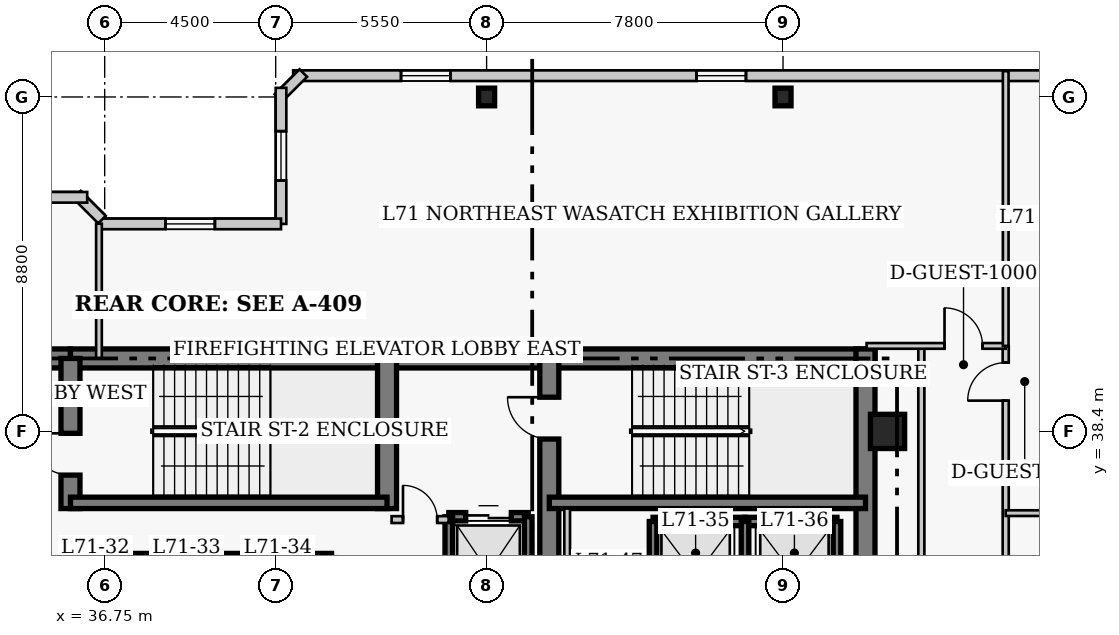
"""IFC4 building model, lengths in metres.
Left out: names, types, materials, properties, quantities, classifications, styles, units other than length and angle.
Written with IfcOpenShell. Run it as: python <this file> out.ifc"""

import sys

from ifc_helpers import new_model, si_unit, direction, frame, frame_2d, origin, origin_2d, place, context, subcontext, project, spatial, rectangle, i_section, extrude, element, fill, save


model = new_model("IFC4")
c1 = context("Model", 3, precision=1e-05, world=origin(), true_north=direction((0.0, 1.0)))
c2 = subcontext(c1, "Body", "Model", "MODEL_VIEW")
j1 = project(units=[si_unit("LENGTHUNIT", "METRE"), si_unit("PLANEANGLEUNIT", "RADIAN")], contexts=[c1])
p1 = place(None, origin())
s1 = spatial("IfcSite", under=j1, at=p1, CompositionType="ELEMENT")
p2 = place(p1, origin())
s2 = spatial("IfcBuilding", under=s1, at=p2, CompositionType="ELEMENT")
p3 = place(p2, frame((0.0, 0.0, 285.4)))
s3 = spatial("IfcBuildingStorey", under=s2, at=p3, CompositionType="ELEMENT", Elevation=285.4)
p4 = place(p3, frame((21.65, 40.32, 0.0), z_axis=(0.0, 0.0, 1.0), x_axis=(1.0, 0.0, 0.0)))
e1 = element("IfcWall", 1, at=p4, inside=s3, PredefinedType="SHEAR", context=c2, shape_type="SweptSolid", body=[
    extrude(rectangle(XDim=14.2, YDim=0.5, at=frame_2d((7.1, 0.0))), origin(), (0.0, 0.0, 1.0), 4.0),
])
p5 = place(p3, frame((35.85, 40.32, 0.0), z_axis=(0.0, 0.0, 1.0), x_axis=(1.0, 0.0, 0.0)))
e2 = element("IfcWall", 2, at=p5, inside=s3, PredefinedType="SHEAR", context=c2, shape_type="SweptSolid", body=[
    extrude(rectangle(XDim=12.6, YDim=0.5, at=frame_2d((6.3, 0.0))), origin(), (0.0, 0.0, 1.0), 4.0),
])
p6 = place(p3, frame((48.45, 40.32, 0.0), z_axis=(0.0, 0.0, 1.0), x_axis=(1.0, 0.0, 0.0)))
e3 = element("IfcWall", 3, at=p6, inside=s3, PredefinedType="SHEAR", context=c2, shape_type="SweptSolid", body=[
    extrude(rectangle(XDim=8.57, YDim=0.5, at=frame_2d((4.285, 0.0))), origin(), (0.0, 0.0, 1.0), 4.0),
])
p7 = place(p3, frame((56.77, 27.05, 0.0), z_axis=(0.0, 0.0, 1.0), x_axis=(0.0, 1.0, 0.0)))
e4 = element("IfcWall", 4, at=p7, inside=s3, PredefinedType="SHEAR", context=c2, shape_type="SweptSolid", body=[
    extrude(rectangle(XDim=13.52, YDim=0.5, at=frame_2d((6.76, 0.0))), origin(), (0.0, 0.0, 1.0), 4.0),
])
p8 = place(p3, frame((35.85, 36.37, 0.0), z_axis=(0.0, 0.0, 1.0), x_axis=(0.0, 1.0, 0.0)))
e5 = element("IfcWall", 5, at=p8, inside=s3, PredefinedType="SHEAR", context=c2, shape_type="SweptSolid", body=[
    extrude(rectangle(XDim=3.95, YDim=0.5, at=frame_2d((1.975, 0.0))), origin(), (0.0, 0.0, 1.0), 4.0),
])
p9 = place(p8, frame((0.88, 0.0, 0.0)))
e6 = element("IfcOpeningElement", 6, at=p9, cuts=e5, PredefinedType="OPENING", context=c2, shape_type="SweptSolid", body=[
    extrude(rectangle(XDim=1.1, YDim=2.15, at=frame_2d((0.55, 1.075))), frame((0.0, 0.26, 0.0), z_axis=(0.0, -1.0, 0.0), x_axis=(1.0, 0.0, 0.0)), (0.0, 0.0, 1.0), 0.52),
])
p10 = place(p3, frame((44.18, 36.37, 0.0), z_axis=(0.0, 0.0, 1.0), x_axis=(0.0, 1.0, 0.0)))
e7 = element("IfcWall", 7, at=p10, inside=s3, PredefinedType="SHEAR", context=c2, shape_type="SweptSolid", body=[
    extrude(rectangle(XDim=3.95, YDim=0.5, at=frame_2d((1.975, 0.0))), origin(), (0.0, 0.0, 1.0), 4.0),
])
p11 = place(p3, frame((48.45, 32.5, 0.0), z_axis=(0.0, 0.0, 1.0), x_axis=(0.0, 1.0, 0.0)))
e8 = element("IfcWall", 8, at=p11, inside=s3, PredefinedType="SHEAR", context=c2, shape_type="SweptSolid", body=[
    extrude(rectangle(XDim=7.82, YDim=0.5, at=frame_2d((3.91, 0.0))), origin(), (0.0, 0.0, 1.0), 4.0),
])
p12 = place(p11, frame((5.7, 0.0, 0.0)))
e9 = element("IfcOpeningElement", 9, at=p12, cuts=e8, PredefinedType="OPENING", context=c2, shape_type="SweptSolid", body=[
    extrude(rectangle(XDim=1.1, YDim=2.15, at=frame_2d((0.55, 1.075))), frame((0.0, 0.26, 0.0), z_axis=(0.0, -1.0, 0.0), x_axis=(1.0, 0.0, 0.0)), (0.0, 0.0, 1.0), 0.52),
])
p13 = place(p3, frame((35.85, 36.52, 0.0), z_axis=(0.0, 0.0, 1.0), x_axis=(1.0, 0.0, 0.0)))
e10 = element("IfcWall", 10, at=p13, inside=s3, PredefinedType="SHEAR", context=c2, shape_type="SweptSolid", body=[
    extrude(rectangle(XDim=8.33, YDim=0.3, at=frame_2d((4.165, 0.0))), origin(), (0.0, 0.0, 1.0), 4.0),
])
p14 = place(p3, frame((48.45, 36.52, 0.0), z_axis=(0.0, 0.0, 1.0), x_axis=(1.0, 0.0, 0.0)))
e11 = element("IfcWall", 11, at=p14, inside=s3, PredefinedType="SHEAR", context=c2, shape_type="SweptSolid", body=[
    extrude(rectangle(XDim=8.32, YDim=0.3, at=frame_2d((4.16, 0.0))), origin(), (0.0, 0.0, 1.0), 4.0),
])
for number, where, z_axis, x_axis in (
    (12, (46.8, 47.2, 0.0), (0.0, 0.0, 1.0), (1.0, 0.0, 0.0)),
    (13, (54.6, 47.2, 0.0), (0.0, 0.0, 1.0), (1.0, 0.0, 0.0)),
):
    element("IfcColumn", number, at=place(p3, frame(where, z_axis=z_axis, x_axis=x_axis)), inside=s3, PredefinedType="COLUMN", context=c2, shape_type="SweptSolid", body=[
        extrude(i_section(OverallWidth=0.422, OverallDepth=0.465, WebThickness=0.045, FlangeThickness=0.073, FilletRadius=0.017, at=origin_2d()), origin(), (0.0, 0.0, 1.0), 4.0),
    ])
p15 = place(p3, frame((57.35, 38.4, 0.0), z_axis=(0.0, 0.0, 1.0), x_axis=(1.0, 0.0, 0.0)))
e14 = element("IfcColumn", 14, at=p15, inside=s3, PredefinedType="COLUMN", context=c2, shape_type="SweptSolid", body=[
    extrude(rectangle(XDim=0.9, YDim=0.9, at=origin_2d()), origin(), (0.0, 0.0, 1.0), 4.0),
])
p16 = place(p3, frame((66.54, 47.76, 0.0), z_axis=(0.0, 0.0, 1.0), x_axis=(-1.0, 0.0, 0.0)))
e15 = element("IfcWall", 15, at=p16, inside=s3, PredefinedType="SOLIDWALL", context=c2, shape_type="SweptSolid", body=[
    extrude(rectangle(XDim=24.83, YDim=0.28, at=frame_2d((12.415, 0.0))), origin(), (0.0, 0.0, 1.0), 3.76),
])
p17 = place(p16, frame((3.488, 0.0, 0.85)))
e16 = element("IfcOpeningElement", 16, at=p17, cuts=e15, PredefinedType="OPENING", context=c2, shape_type="SweptSolid", body=[
    extrude(rectangle(XDim=1.3, YDim=1.7, at=frame_2d((0.65, 0.85))), frame((0.0, 0.15, 0.0), z_axis=(0.0, -1.0, 0.0), x_axis=(1.0, 0.0, 0.0)), (0.0, 0.0, 1.0), 0.3),
])
p18 = place(p16, frame((12.915, 0.0, 0.85)))
e17 = element("IfcOpeningElement", 17, at=p18, cuts=e15, PredefinedType="OPENING", context=c2, shape_type="SweptSolid", body=[
    extrude(rectangle(XDim=1.3, YDim=1.7, at=frame_2d((0.65, 0.85))), frame((0.0, 0.15, 0.0), z_axis=(0.0, -1.0, 0.0), x_axis=(1.0, 0.0, 0.0)), (0.0, 0.0, 1.0), 0.3),
])
p19 = place(p16, frame((20.692, 0.0, 0.85)))
e18 = element("IfcOpeningElement", 18, at=p19, cuts=e15, PredefinedType="OPENING", context=c2, shape_type="SweptSolid", body=[
    extrude(rectangle(XDim=1.3, YDim=1.7, at=frame_2d((0.65, 0.85))), frame((0.0, 0.15, 0.0), z_axis=(0.0, -1.0, 0.0), x_axis=(1.0, 0.0, 0.0)), (0.0, 0.0, 1.0), 0.3),
])
p20 = place(p3, frame((41.977, 47.829, 0.0), z_axis=(0.0, 0.0, 1.0), x_axis=(-0.706975312048, -0.707238225886, 0.0)))
e19 = element("IfcWall", 19, at=p20, inside=s3, PredefinedType="SOLIDWALL", context=c2, shape_type="SweptSolid", body=[
    extrude(rectangle(XDim=0.929, YDim=0.28, at=frame_2d((0.464, 0.0))), origin(), (0.0, 0.0, 1.0), 3.76),
])
p21 = place(p3, frame((41.39, 47.44, 0.0), z_axis=(0.0, 0.0, 1.0), x_axis=(0.0, -1.0, 0.0)))
e20 = element("IfcWall", 20, at=p21, inside=s3, PredefinedType="SOLIDWALL", context=c2, shape_type="SweptSolid", body=[
    extrude(rectangle(XDim=3.58, YDim=0.28, at=frame_2d((1.79, 0.0))), origin(), (0.0, 0.0, 1.0), 3.76),
])
p22 = place(p21, frame((1.14, 0.0, 0.85)))
e21 = element("IfcOpeningElement", 21, at=p22, cuts=e20, PredefinedType="OPENING", context=c2, shape_type="SweptSolid", body=[
    extrude(rectangle(XDim=1.3, YDim=1.7, at=frame_2d((0.65, 0.85))), frame((0.0, 0.15, 0.0), z_axis=(0.0, -1.0, 0.0), x_axis=(1.0, 0.0, 0.0)), (0.0, 0.0, 1.0), 0.3),
])
p23 = place(p3, frame((41.39, 43.86, 0.0), z_axis=(0.0, 0.0, 1.0), x_axis=(-1.0, 0.0, 0.0)))
e22 = element("IfcWall", 22, at=p23, inside=s3, PredefinedType="SOLIDWALL", context=c2, shape_type="SweptSolid", body=[
    extrude(rectangle(XDim=4.78, YDim=0.28, at=frame_2d((2.39, 0.0))), origin(), (0.0, 0.0, 1.0), 3.76),
])
p24 = place(p23, frame((1.74, 0.0, 0.85)))
e23 = element("IfcOpeningElement", 23, at=p24, cuts=e22, PredefinedType="OPENING", context=c2, shape_type="SweptSolid", body=[
    extrude(rectangle(XDim=1.3, YDim=1.7, at=frame_2d((0.65, 0.85))), frame((0.0, 0.15, 0.0), z_axis=(0.0, -1.0, 0.0), x_axis=(1.0, 0.0, 0.0)), (0.0, 0.0, 1.0), 0.3),
])
p25 = place(p3, frame((36.679, 43.973, 0.0), z_axis=(0.0, 0.0, 1.0), x_axis=(-0.706975312048, 0.707238225886, 0.0)))
e24 = element("IfcWall", 24, at=p25, inside=s3, PredefinedType="SOLIDWALL", context=c2, shape_type="SweptSolid", body=[
    extrude(rectangle(XDim=0.929, YDim=0.28, at=frame_2d((0.464, 0.0))), origin(), (0.0, 0.0, 1.0), 3.76),
])
p26 = place(p3, frame((36.29, 44.56, 0.0), z_axis=(0.0, 0.0, 1.0), x_axis=(-1.0, 0.0, 0.0)))
e25 = element("IfcWall", 25, at=p26, inside=s3, PredefinedType="SOLIDWALL", context=c2, shape_type="SweptSolid", body=[
    extrude(rectangle(XDim=24.83, YDim=0.28, at=frame_2d((12.415, 0.0))), origin(), (0.0, 0.0, 1.0), 3.76),
])
p27 = place(p26, frame((3.488, 0.0, 0.85)))
e26 = element("IfcOpeningElement", 26, at=p27, cuts=e25, PredefinedType="OPENING", context=c2, shape_type="SweptSolid", body=[
    extrude(rectangle(XDim=1.3, YDim=1.7, at=frame_2d((0.65, 0.85))), frame((0.0, 0.15, 0.0), z_axis=(0.0, -1.0, 0.0), x_axis=(1.0, 0.0, 0.0)), (0.0, 0.0, 1.0), 0.3),
])
p28 = place(p26, frame((11.765, 0.0, 0.85)))
e27 = element("IfcOpeningElement", 27, at=p28, cuts=e25, PredefinedType="OPENING", context=c2, shape_type="SweptSolid", body=[
    extrude(rectangle(XDim=1.3, YDim=1.7, at=frame_2d((0.65, 0.85))), frame((0.0, 0.15, 0.0), z_axis=(0.0, -1.0, 0.0), x_axis=(1.0, 0.0, 0.0)), (0.0, 0.0, 1.0), 0.3),
])
p29 = place(p26, frame((20.042, 0.0, 0.85)))
e28 = element("IfcOpeningElement", 28, at=p29, cuts=e25, PredefinedType="OPENING", context=c2, shape_type="SweptSolid", body=[
    extrude(rectangle(XDim=1.3, YDim=1.7, at=frame_2d((0.65, 0.85))), frame((0.0, 0.15, 0.0), z_axis=(0.0, -1.0, 0.0), x_axis=(1.0, 0.0, 0.0)), (0.0, 0.0, 1.0), 0.3),
])
p30 = place(p3, frame((35.68, 35.08, 0.0), z_axis=(0.0, 0.0, 1.0), x_axis=(1.0, 0.0, 0.0)))
e29 = element("IfcWall", 29, at=p30, inside=s3, PredefinedType="SHEAR", context=c2, shape_type="SweptSolid", body=[
    extrude(rectangle(XDim=2.32, YDim=0.22, at=frame_2d((1.16, 0.0))), origin(), (0.0, 0.0, 1.0), 4.0),
])
p31 = place(p3, frame((38.0, 35.08, 0.0), z_axis=(0.0, 0.0, 1.0), x_axis=(1.0, 0.0, 0.0)))
e30 = element("IfcWall", 30, at=p31, inside=s3, PredefinedType="SHEAR", context=c2, shape_type="SweptSolid", body=[
    extrude(rectangle(XDim=2.4, YDim=0.22, at=frame_2d((1.2, 0.0))), origin(), (0.0, 0.0, 1.0), 4.0),
])
p32 = place(p3, frame((40.4, 35.08, 0.0), z_axis=(0.0, 0.0, 1.0), x_axis=(1.0, 0.0, 0.0)))
e31 = element("IfcWall", 31, at=p32, inside=s3, PredefinedType="SHEAR", context=c2, shape_type="SweptSolid", body=[
    extrude(rectangle(XDim=2.32, YDim=0.22, at=frame_2d((1.16, 0.0))), origin(), (0.0, 0.0, 1.0), 4.0),
])
p33 = place(p3, frame((51.18, 36.03, 0.0), z_axis=(0.0, 0.0, 1.0), x_axis=(1.0, 0.0, 0.0)))
e32 = element("IfcWall", 32, at=p33, inside=s3, PredefinedType="SHEAR", context=c2, shape_type="SweptSolid", body=[
    extrude(rectangle(XDim=2.42, YDim=0.22, at=frame_2d((1.21, 0.0))), origin(), (0.0, 0.0, 1.0), 4.0),
])
p34 = place(p3, frame((51.18, 33.17, 0.0), z_axis=(0.0, 0.0, 1.0), x_axis=(0.0, 1.0, 0.0)))
e33 = element("IfcWall", 33, at=p34, inside=s3, PredefinedType="SHEAR", context=c2, shape_type="SweptSolid", body=[
    extrude(rectangle(XDim=2.86, YDim=0.2, at=frame_2d((1.43, 0.0))), origin(), (0.0, 0.0, 1.0), 4.0),
])
p35 = place(p3, frame((53.6, 36.03, 0.0), z_axis=(0.0, 0.0, 1.0), x_axis=(1.0, 0.0, 0.0)))
e34 = element("IfcWall", 34, at=p35, inside=s3, PredefinedType="SHEAR", context=c2, shape_type="SweptSolid", body=[
    extrude(rectangle(XDim=2.42, YDim=0.22, at=frame_2d((1.21, 0.0))), origin(), (0.0, 0.0, 1.0), 4.0),
])
for number, where, z_axis, x_axis in (
    (35, (53.6, 33.17, 0.0), (0.0, 0.0, 1.0), (0.0, 1.0, 0.0)),
    (36, (56.02, 33.17, 0.0), (0.0, 0.0, 1.0), (0.0, 1.0, 0.0)),
):
    element("IfcWall", number, at=place(p3, frame(where, z_axis=z_axis, x_axis=x_axis)), inside=s3, PredefinedType="SHEAR", context=c2, shape_type="SweptSolid", body=[
        extrude(rectangle(XDim=2.86, YDim=0.2, at=frame_2d((1.43, 0.0))), origin(), (0.0, 0.0, 1.0), 4.0),
    ])
p36 = place(p3, frame((45.805, 36.155, 0.0), z_axis=(0.0, 0.0, 1.0), x_axis=(1.0, 0.0, 0.0)))
e37 = element("IfcWall", 37, at=p36, inside=s3, PredefinedType="SHEAR", context=c2, shape_type="SweptSolid", body=[
    extrude(rectangle(XDim=2.09, YDim=0.22, at=frame_2d((1.045, 0.0))), origin(), (0.0, 0.0, 1.0), 4.0),
])
p37 = place(p36, frame((0.445, 0.0, 0.0)))
e38 = element("IfcOpeningElement", 38, at=p37, cuts=e37, PredefinedType="OPENING", context=c2, shape_type="SweptSolid", body=[
    extrude(rectangle(XDim=1.2, YDim=2.15, at=frame_2d((0.6, 1.075))), frame((0.0, 0.12, 0.0), z_axis=(0.0, -1.0, 0.0), x_axis=(1.0, 0.0, 0.0)), (0.0, 0.0, 1.0), 0.24),
])
p38 = place(p3, frame((45.805, 32.65, 0.0), z_axis=(0.0, 0.0, 1.0), x_axis=(0.0, 1.0, 0.0)))
e39 = element("IfcWall", 39, at=p38, inside=s3, PredefinedType="SHEAR", context=c2, shape_type="SweptSolid", body=[
    extrude(rectangle(XDim=3.505, YDim=0.2, at=frame_2d((1.752, 0.0))), origin(), (0.0, 0.0, 1.0), 4.0),
])
p39 = place(p3, frame((47.895, 33.245, 0.0), z_axis=(0.0, 0.0, 1.0), x_axis=(0.0, 1.0, 0.0)))
e40 = element("IfcWall", 40, at=p39, inside=s3, PredefinedType="SHEAR", context=c2, shape_type="SweptSolid", body=[
    extrude(rectangle(XDim=2.91, YDim=0.2, at=frame_2d((1.455, 0.0))), origin(), (0.0, 0.0, 1.0), 4.0),
])
p40 = place(p3, frame((44.3, 36.08, 0.0), z_axis=(0.0, 0.0, 1.0), x_axis=(1.0, 0.0, 0.0)))
e41 = element("IfcWall", 41, at=p40, inside=s3, PredefinedType="PARTITIONING", context=c2, shape_type="SweptSolid", body=[
    extrude(rectangle(XDim=1.5, YDim=0.18, at=frame_2d((0.75, 0.0))), origin(), (0.0, 0.0, 1.0), 3.76),
])
p41 = place(p40, frame((0.3, 0.0, 0.0)))
e42 = element("IfcOpeningElement", 42, at=p41, cuts=e41, PredefinedType="OPENING", context=c2, shape_type="SweptSolid", body=[
    extrude(rectangle(XDim=0.9, YDim=2.15, at=frame_2d((0.45, 1.075))), frame((0.0, 0.1, 0.0), z_axis=(0.0, -1.0, 0.0), x_axis=(1.0, 0.0, 0.0)), (0.0, 0.0, 1.0), 0.2),
])
p42 = place(p3, frame((48.92, 32.75, 0.0), z_axis=(0.0, 0.0, 1.0), x_axis=(0.0, 1.0, 0.0)))
e43 = element("IfcWall", 43, at=p42, inside=s3, PredefinedType="PARTITIONING", context=c2, shape_type="SweptSolid", body=[
    extrude(rectangle(XDim=3.62, YDim=0.15, at=frame_2d((1.81, 0.0))), origin(), (0.0, 0.0, 1.0), 3.76),
])
p43 = place(p3, frame((60.46, 23.85, 0.0), z_axis=(0.0, 0.0, 1.0), x_axis=(0.0, 1.0, 0.0)))
e44 = element("IfcWall", 44, at=p43, inside=s3, PredefinedType="PARTITIONING", context=c2, shape_type="SweptSolid", body=[
    extrude(rectangle(XDim=16.8, YDim=0.16, at=frame_2d((8.4, 0.0))), origin(), (0.0, 0.0, 1.0), 3.76),
])
p44 = place(p43, frame((0.46, 0.0, 0.0)))
e45 = element("IfcOpeningElement", 45, at=p44, cuts=e44, PredefinedType="OPENING", context=c2, shape_type="SweptSolid", body=[
    extrude(rectangle(XDim=0.95, YDim=2.1, at=frame_2d((0.475, 1.05))), frame((0.0, 0.09, 0.0), z_axis=(0.0, -1.0, 0.0), x_axis=(1.0, 0.0, 0.0)), (0.0, 0.0, 1.0), 0.18),
])
p45 = place(p43, frame((15.36, 0.0, 0.0)))
e46 = element("IfcOpeningElement", 46, at=p45, cuts=e44, PredefinedType="OPENING", context=c2, shape_type="SweptSolid", body=[
    extrude(rectangle(XDim=1.0, YDim=2.15, at=frame_2d((0.5, 1.075))), frame((0.0, 0.09, 0.0), z_axis=(0.0, -1.0, 0.0), x_axis=(1.0, 0.0, 0.0)), (0.0, 0.0, 1.0), 0.18),
])
p46 = place(p3, frame((58.24, 26.01, 0.0), z_axis=(0.0, 0.0, 1.0), x_axis=(0.0, 1.0, 0.0)))
e47 = element("IfcWall", 47, at=p46, inside=s3, PredefinedType="PARTITIONING", context=c2, shape_type="SweptSolid", body=[
    extrude(rectangle(XDim=14.64, YDim=0.16, at=frame_2d((7.32, 0.0))), origin(), (0.0, 0.0, 1.0), 3.76),
])
p47 = place(p3, frame((56.8, 40.65, 0.0), z_axis=(0.0, 0.0, 1.0), x_axis=(1.0, 0.0, 0.0)))
e48 = element("IfcWall", 48, at=p47, inside=s3, PredefinedType="PARTITIONING", context=c2, shape_type="SweptSolid", body=[
    extrude(rectangle(XDim=3.66, YDim=0.15, at=frame_2d((1.83, 0.0))), origin(), (0.0, 0.0, 1.0), 3.76),
])
p48 = place(p47, frame((2.05, 0.0, 0.0)))
e49 = element("IfcOpeningElement", 49, at=p48, cuts=e48, PredefinedType="OPENING", context=c2, shape_type="SweptSolid", body=[
    extrude(rectangle(XDim=1.0, YDim=2.15, at=frame_2d((0.5, 1.075))), frame((0.0, 0.085, 0.0), z_axis=(0.0, -1.0, 0.0), x_axis=(1.0, 0.0, 0.0)), (0.0, 0.0, 1.0), 0.17),
])
p49 = place(p3, frame((36.6, 40.32, 0.0), z_axis=(0.0, 0.0, 1.0), x_axis=(0.0, 1.0, 0.0)))
e50 = element("IfcWall", 50, at=p49, inside=s3, PredefinedType="PARTITIONING", context=c2, shape_type="SweptSolid", body=[
    extrude(rectangle(XDim=3.545, YDim=0.15, at=frame_2d((1.772, 0.0))), origin(), (0.0, 0.0, 1.0), 3.76),
])
p50 = place(p3, frame((60.46, 40.65, 0.0), z_axis=(0.0, 0.0, 1.0), x_axis=(0.0, 1.0, 0.0)))
e51 = element("IfcWall", 51, at=p50, inside=s3, PredefinedType="PARTITIONING", context=c2, shape_type="SweptSolid", body=[
    extrude(rectangle(XDim=7.23, YDim=0.15, at=frame_2d((3.615, 0.0))), origin(), (0.0, 0.0, 1.0), 3.76),
])
p51 = place(p3, frame((60.46, 36.25, 0.0), z_axis=(0.0, 0.0, 1.0), x_axis=(1.0, 0.0, 0.0)))
e52 = element("IfcWall", 52, at=p51, inside=s3, PredefinedType="PARTITIONING", context=c2, shape_type="SweptSolid", body=[
    extrude(rectangle(XDim=9.72, YDim=0.15, at=frame_2d((4.86, 0.0))), origin(), (0.0, 0.0, 1.0), 3.76),
])
p52 = place(p18, origin())
e53 = element("IfcWindow", 53, at=p52, inside=s3, PartitioningType="SINGLE_PANEL", PredefinedType="WINDOW", context=c2, shape_type="SweptSolid", body=[
    extrude(rectangle(XDim=1.3, YDim=1.7, at=frame_2d((0.65, 0.85))), frame((0.0, 0.03, 0.0), z_axis=(0.0, -1.0, 0.0), x_axis=(1.0, 0.0, 0.0)), (0.0, 0.0, 1.0), 0.06),
])
fill(e17, e53)
p53 = place(p19, origin())
e54 = element("IfcWindow", 54, at=p53, inside=s3, PartitioningType="SINGLE_PANEL", PredefinedType="WINDOW", context=c2, shape_type="SweptSolid", body=[
    extrude(rectangle(XDim=1.3, YDim=1.7, at=frame_2d((0.65, 0.85))), frame((0.0, 0.03, 0.0), z_axis=(0.0, -1.0, 0.0), x_axis=(1.0, 0.0, 0.0)), (0.0, 0.0, 1.0), 0.06),
])
fill(e18, e54)
p54 = place(p22, origin())
e55 = element("IfcWindow", 55, at=p54, inside=s3, PartitioningType="SINGLE_PANEL", PredefinedType="WINDOW", context=c2, shape_type="SweptSolid", body=[
    extrude(rectangle(XDim=1.3, YDim=1.7, at=frame_2d((0.65, 0.85))), frame((0.0, 0.03, 0.0), z_axis=(0.0, -1.0, 0.0), x_axis=(1.0, 0.0, 0.0)), (0.0, 0.0, 1.0), 0.06),
])
fill(e21, e55)
p55 = place(p24, origin())
e56 = element("IfcWindow", 56, at=p55, inside=s3, PartitioningType="SINGLE_PANEL", PredefinedType="WINDOW", context=c2, shape_type="SweptSolid", body=[
    extrude(rectangle(XDim=1.3, YDim=1.7, at=frame_2d((0.65, 0.85))), frame((0.0, 0.03, 0.0), z_axis=(0.0, -1.0, 0.0), x_axis=(1.0, 0.0, 0.0)), (0.0, 0.0, 1.0), 0.06),
])
fill(e23, e56)
p56 = place(p37, origin())
e57 = element("IfcDoor", 57, at=p56, inside=s3, OperationType="DOUBLE_DOOR_SLIDING", PredefinedType="DOOR", context=c2, shape_type="SweptSolid", body=[
    extrude(rectangle(XDim=1.2, YDim=2.15, at=frame_2d((0.6, 1.075))), frame((0.0, 0.025, 0.0), z_axis=(0.0, -1.0, 0.0), x_axis=(1.0, 0.0, 0.0)), (0.0, 0.0, 1.0), 0.05),
])
fill(e38, e57)
p57 = place(p41, origin())
e58 = element("IfcDoor", 58, at=p57, inside=s3, OperationType="SINGLE_SWING_LEFT", PredefinedType="DOOR", context=c2, shape_type="SweptSolid", body=[
    extrude(rectangle(XDim=0.9, YDim=2.15, at=frame_2d((0.45, 1.075))), frame((0.0, 0.025, 0.0), z_axis=(0.0, -1.0, 0.0), x_axis=(1.0, 0.0, 0.0)), (0.0, 0.0, 1.0), 0.05),
])
fill(e42, e58)
p58 = place(p48, origin())
e59 = element("IfcDoor", 59, at=p58, inside=s3, OperationType="SINGLE_SWING_LEFT", PredefinedType="DOOR", context=c2, shape_type="SweptSolid", body=[
    extrude(rectangle(XDim=1.0, YDim=2.15, at=frame_2d((0.5, 1.075))), frame((0.0, 0.025, 0.0), z_axis=(0.0, -1.0, 0.0), x_axis=(1.0, 0.0, 0.0)), (0.0, 0.0, 1.0), 0.05),
])
fill(e49, e59)
p59 = place(p45, origin())
e60 = element("IfcDoor", 60, at=p59, inside=s3, OperationType="SINGLE_SWING_LEFT", PredefinedType="DOOR", context=c2, shape_type="SweptSolid", body=[
    extrude(rectangle(XDim=1.0, YDim=2.15, at=frame_2d((0.5, 1.075))), frame((0.0, 0.025, 0.0), z_axis=(0.0, -1.0, 0.0), x_axis=(1.0, 0.0, 0.0)), (0.0, 0.0, 1.0), 0.05),
])
fill(e46, e60)
p60 = place(p9, origin())
e61 = element("IfcDoor", 61, at=p60, inside=s3, OperationType="SINGLE_SWING_RIGHT", PredefinedType="DOOR", context=c2, shape_type="SweptSolid", body=[
    extrude(rectangle(XDim=1.1, YDim=2.15, at=frame_2d((0.55, 1.075))), frame((0.0, 0.025, 0.0), z_axis=(0.0, -1.0, 0.0), x_axis=(1.0, 0.0, 0.0)), (0.0, 0.0, 1.0), 0.05),
])
fill(e6, e61)
p61 = place(p12, origin())
e62 = element("IfcDoor", 62, at=p61, inside=s3, OperationType="SINGLE_SWING_RIGHT", PredefinedType="DOOR", context=c2, shape_type="SweptSolid", body=[
    extrude(rectangle(XDim=1.1, YDim=2.15, at=frame_2d((0.55, 1.075))), frame((0.0, 0.025, 0.0), z_axis=(0.0, -1.0, 0.0), x_axis=(1.0, 0.0, 0.0)), (0.0, 0.0, 1.0), 0.05),
])
fill(e9, e62)
save(model, sys.argv[1])
